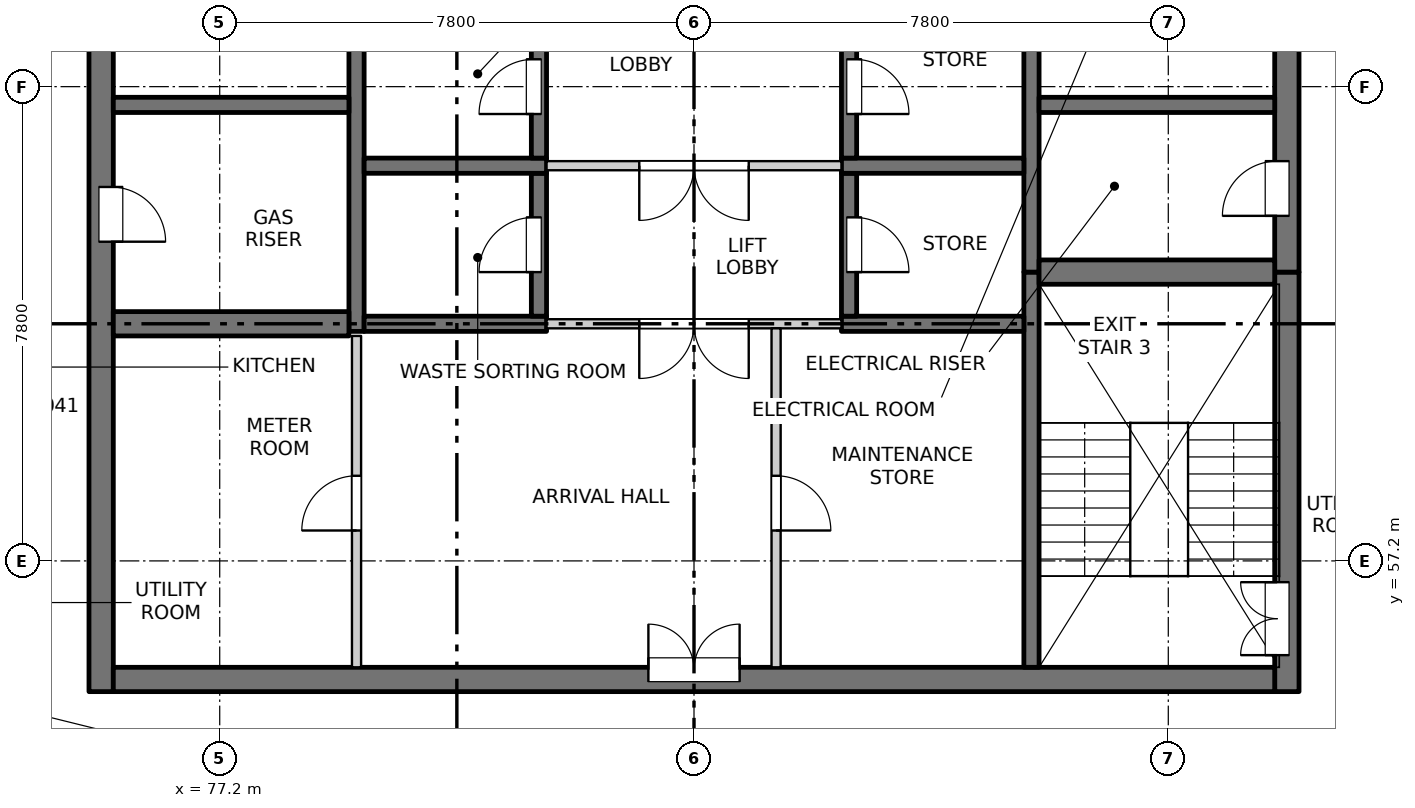
"""IFC4 building model, lengths in metres.
Left out: names, types, materials, properties, quantities, classifications, styles, units other than length and angle.
Written with IfcOpenShell. Run it as: python <this file> out.ifc"""

import sys

from ifc_helpers import new_model, si_unit, direction, frame, frame_2d, origin, place, context, subcontext, project, spatial, rectangle, extrude, element, fill, save


model = new_model("IFC4")
c1 = context("Model", 3, precision=1e-05, world=origin(), true_north=direction((0.0, 1.0)))
c2 = subcontext(c1, "Body", "Model", "MODEL_VIEW")
j1 = project(units=[si_unit("LENGTHUNIT", "METRE"), si_unit("PLANEANGLEUNIT", "RADIAN")], contexts=[c1])
p1 = place(None, origin())
s1 = spatial("IfcSite", under=j1, at=p1, CompositionType="ELEMENT")
p2 = place(p1, origin())
s2 = spatial("IfcBuilding", under=s1, at=p2, CompositionType="ELEMENT")
p3 = place(p2, frame((0.0, 0.0, 197.3)))
s3 = spatial("IfcBuildingStorey", under=s2, at=p3, CompositionType="ELEMENT", Elevation=197.3)
p4 = place(p3, frame((75.25, 55.05, -0.3), z_axis=(0.0, 0.0, 1.0), x_axis=(0.0, 1.0, 0.0)))
e1 = element("IfcWall", 1, at=p4, inside=s3, PredefinedType="SOLIDWALL", context=c2, shape_type="SweptSolid", body=[
    extrude(rectangle(XDim=22.25, YDim=0.4, at=frame_2d((11.125, 0.0))), origin(), (0.0, 0.0, 1.0), 3.45),
])
p5 = place(p4, frame((7.4, 0.0, 0.3)))
e2 = element("IfcOpeningElement", 2, at=p5, cuts=e1, PredefinedType="OPENING", context=c2, shape_type="SweptSolid", body=[
    extrude(rectangle(XDim=0.9, YDim=2.1, at=frame_2d((0.45, 1.05))), frame((0.0, 0.21, 0.0), z_axis=(0.0, -1.0, 0.0), x_axis=(1.0, 0.0, 0.0)), (0.0, 0.0, 1.0), 0.42),
])
p6 = place(p4, frame((13.7, 0.0, 0.3)))
e3 = element("IfcOpeningElement", 3, at=p6, cuts=e1, PredefinedType="OPENING", context=c2, shape_type="SweptSolid", body=[
    extrude(rectangle(XDim=0.9, YDim=2.1, at=frame_2d((0.45, 1.05))), frame((0.0, 0.21, 0.0), z_axis=(0.0, -1.0, 0.0), x_axis=(1.0, 0.0, 0.0)), (0.0, 0.0, 1.0), 0.42),
])
p7 = place(p4, frame((20.0, 0.0, 0.3)))
e4 = element("IfcOpeningElement", 4, at=p7, cuts=e1, PredefinedType="OPENING", context=c2, shape_type="SweptSolid", body=[
    extrude(rectangle(XDim=0.9, YDim=2.1, at=frame_2d((0.45, 1.05))), frame((0.0, 0.21, 0.0), z_axis=(0.0, -1.0, 0.0), x_axis=(1.0, 0.0, 0.0)), (0.0, 0.0, 1.0), 0.42),
])
p8 = place(p3, frame((94.75, 55.05, -0.3), z_axis=(0.0, 0.0, 1.0), x_axis=(0.0, 1.0, 0.0)))
e5 = element("IfcWall", 5, at=p8, inside=s3, PredefinedType="SOLIDWALL", context=c2, shape_type="SweptSolid", body=[
    extrude(rectangle(XDim=6.9, YDim=0.4, at=frame_2d((3.45, 0.0))), origin(), (0.0, 0.0, 1.0), 3.45),
])
p9 = place(p8, frame((0.6, 0.0, 0.3)))
e6 = element("IfcOpeningElement", 6, at=p9, cuts=e5, PredefinedType="OPENING", context=c2, shape_type="SweptSolid", body=[
    extrude(rectangle(XDim=1.2, YDim=2.1, at=frame_2d((0.6, 1.05))), frame((0.0, 0.21, 0.0), z_axis=(0.0, -1.0, 0.0), x_axis=(1.0, 0.0, 0.0)), (0.0, 0.0, 1.0), 0.42),
])
p10 = place(p3, frame((94.75, 61.95, -0.3), z_axis=(0.0, 0.0, 1.0), x_axis=(0.0, 1.0, 0.0)))
e7 = element("IfcWall", 7, at=p10, inside=s3, PredefinedType="SOLIDWALL", context=c2, shape_type="SweptSolid", body=[
    extrude(rectangle(XDim=15.35, YDim=0.4, at=frame_2d((7.675, 0.0))), origin(), (0.0, 0.0, 1.0), 3.45),
])
p11 = place(p10, frame((0.925, 0.0, 0.3)))
e8 = element("IfcOpeningElement", 8, at=p11, cuts=e7, PredefinedType="OPENING", context=c2, shape_type="SweptSolid", body=[
    extrude(rectangle(XDim=0.9, YDim=2.1, at=frame_2d((0.45, 1.05))), frame((0.0, 0.21, 0.0), z_axis=(0.0, -1.0, 0.0), x_axis=(1.0, 0.0, 0.0)), (0.0, 0.0, 1.0), 0.42),
])
p12 = place(p10, frame((3.8, 0.0, 0.3)))
e9 = element("IfcOpeningElement", 9, at=p12, cuts=e7, PredefinedType="OPENING", context=c2, shape_type="SweptSolid", body=[
    extrude(rectangle(XDim=0.9, YDim=2.1, at=frame_2d((0.45, 1.05))), frame((0.0, 0.21, 0.0), z_axis=(0.0, -1.0, 0.0), x_axis=(1.0, 0.0, 0.0)), (0.0, 0.0, 1.0), 0.42),
])
p13 = place(p10, frame((6.8, 0.0, 0.3)))
e10 = element("IfcOpeningElement", 10, at=p13, cuts=e7, PredefinedType="OPENING", context=c2, shape_type="SweptSolid", body=[
    extrude(rectangle(XDim=0.9, YDim=2.1, at=frame_2d((0.45, 1.05))), frame((0.0, 0.21, 0.0), z_axis=(0.0, -1.0, 0.0), x_axis=(1.0, 0.0, 0.0)), (0.0, 0.0, 1.0), 0.42),
])
p14 = place(p10, frame((9.8, 0.0, 0.3)))
e11 = element("IfcOpeningElement", 11, at=p14, cuts=e7, PredefinedType="OPENING", context=c2, shape_type="SweptSolid", body=[
    extrude(rectangle(XDim=0.9, YDim=2.1, at=frame_2d((0.45, 1.05))), frame((0.0, 0.21, 0.0), z_axis=(0.0, -1.0, 0.0), x_axis=(1.0, 0.0, 0.0)), (0.0, 0.0, 1.0), 0.42),
])
p15 = place(p10, frame((13.1, 0.0, 0.3)))
e12 = element("IfcOpeningElement", 12, at=p15, cuts=e7, PredefinedType="OPENING", context=c2, shape_type="SweptSolid", body=[
    extrude(rectangle(XDim=0.9, YDim=2.1, at=frame_2d((0.45, 1.05))), frame((0.0, 0.21, 0.0), z_axis=(0.0, -1.0, 0.0), x_axis=(1.0, 0.0, 0.0)), (0.0, 0.0, 1.0), 0.42),
])
p16 = place(p3, frame((75.45, 55.25, -0.3), z_axis=(0.0, 0.0, 1.0), x_axis=(1.0, 0.0, 0.0)))
e13 = element("IfcWall", 13, at=p16, inside=s3, PredefinedType="SOLIDWALL", context=c2, shape_type="SweptSolid", body=[
    extrude(rectangle(XDim=19.1, YDim=0.4, at=frame_2d((9.55, 0.0))), origin(), (0.0, 0.0, 1.0), 3.45),
])
p17 = place(p16, frame((8.8, 0.0, 0.3)))
e14 = element("IfcOpeningElement", 14, at=p17, cuts=e13, PredefinedType="OPENING", context=c2, shape_type="SweptSolid", body=[
    extrude(rectangle(XDim=1.5, YDim=2.1, at=frame_2d((0.75, 1.05))), frame((0.0, 0.21, 0.0), z_axis=(0.0, -1.0, 0.0), x_axis=(1.0, 0.0, 0.0)), (0.0, 0.0, 1.0), 0.42),
])
p18 = place(p3, frame((79.45, 60.975, -0.3), z_axis=(0.0, 0.0, 1.0), x_axis=(0.0, 1.0, 0.0)))
e15 = element("IfcWall", 15, at=p18, inside=s3, PredefinedType="SOLIDWALL", context=c2, shape_type="SweptSolid", body=[
    extrude(rectangle(XDim=16.325, YDim=0.25, at=frame_2d((8.163, 0.0))), origin(), (0.0, 0.0, 1.0), 3.45),
])
p19 = place(p3, frame((90.55, 55.45, -0.3), z_axis=(0.0, 0.0, 1.0), x_axis=(0.0, 1.0, 0.0)))
e16 = element("IfcWall", 16, at=p19, inside=s3, PredefinedType="SOLIDWALL", context=c2, shape_type="SweptSolid", body=[
    extrude(rectangle(XDim=6.5, YDim=0.25, at=frame_2d((3.25, 0.0))), origin(), (0.0, 0.0, 1.0), 3.45),
])
p20 = place(p3, frame((90.55, 61.95, -0.3), z_axis=(0.0, 0.0, 1.0), x_axis=(0.0, 1.0, 0.0)))
e17 = element("IfcWall", 17, at=p20, inside=s3, PredefinedType="SOLIDWALL", context=c2, shape_type="SweptSolid", body=[
    extrude(rectangle(XDim=15.35, YDim=0.25, at=frame_2d((7.675, 0.0))), origin(), (0.0, 0.0, 1.0), 3.45),
])
p21 = place(p3, frame((79.575, 61.1, -0.3), z_axis=(0.0, 0.0, 1.0), x_axis=(1.0, 0.0, 0.0)))
e18 = element("IfcWall", 18, at=p21, inside=s3, PredefinedType="SOLIDWALL", context=c2, shape_type="SweptSolid", body=[
    extrude(rectangle(XDim=3.0, YDim=0.25, at=frame_2d((1.5, 0.0))), origin(), (0.0, 0.0, 1.0), 3.45),
])
p22 = place(p3, frame((82.45, 61.225, -0.3), z_axis=(0.0, 0.0, 1.0), x_axis=(0.0, 1.0, 0.0)))
e19 = element("IfcWall", 19, at=p22, inside=s3, PredefinedType="SOLIDWALL", context=c2, shape_type="SweptSolid", body=[
    extrude(rectangle(XDim=2.35, YDim=0.25, at=frame_2d((1.175, 0.0))), origin(), (0.0, 0.0, 1.0), 3.45),
])
p23 = place(p22, frame((0.725, 0.0, 0.3)))
e20 = element("IfcOpeningElement", 20, at=p23, cuts=e19, PredefinedType="OPENING", context=c2, shape_type="SweptSolid", body=[
    extrude(rectangle(XDim=0.9, YDim=2.1, at=frame_2d((0.45, 1.05))), frame((0.0, 0.135, 0.0), z_axis=(0.0, -1.0, 0.0), x_axis=(1.0, 0.0, 0.0)), (0.0, 0.0, 1.0), 0.27),
])
p24 = place(p3, frame((79.575, 63.7, -0.3), z_axis=(0.0, 0.0, 1.0), x_axis=(1.0, 0.0, 0.0)))
e21 = element("IfcWall", 21, at=p24, inside=s3, PredefinedType="SOLIDWALL", context=c2, shape_type="SweptSolid", body=[
    extrude(rectangle(XDim=3.0, YDim=0.25, at=frame_2d((1.5, 0.0))), origin(), (0.0, 0.0, 1.0), 3.45),
])
p25 = place(p3, frame((82.45, 63.825, -0.3), z_axis=(0.0, 0.0, 1.0), x_axis=(0.0, 1.0, 0.0)))
e22 = element("IfcWall", 22, at=p25, inside=s3, PredefinedType="SOLIDWALL", context=c2, shape_type="SweptSolid", body=[
    extrude(rectangle(XDim=2.35, YDim=0.25, at=frame_2d((1.175, 0.0))), origin(), (0.0, 0.0, 1.0), 3.45),
])
p26 = place(p25, frame((0.725, 0.0, 0.3)))
e23 = element("IfcOpeningElement", 23, at=p26, cuts=e22, PredefinedType="OPENING", context=c2, shape_type="SweptSolid", body=[
    extrude(rectangle(XDim=0.9, YDim=2.1, at=frame_2d((0.45, 1.05))), frame((0.0, 0.135, 0.0), z_axis=(0.0, -1.0, 0.0), x_axis=(1.0, 0.0, 0.0)), (0.0, 0.0, 1.0), 0.27),
])
p27 = place(p3, frame((87.425, 61.1, -0.3), z_axis=(0.0, 0.0, 1.0), x_axis=(1.0, 0.0, 0.0)))
e24 = element("IfcWall", 24, at=p27, inside=s3, PredefinedType="SOLIDWALL", context=c2, shape_type="SweptSolid", body=[
    extrude(rectangle(XDim=3.0, YDim=0.25, at=frame_2d((1.5, 0.0))), origin(), (0.0, 0.0, 1.0), 3.45),
])
p28 = place(p3, frame((87.55, 61.225, -0.3), z_axis=(0.0, 0.0, 1.0), x_axis=(0.0, 1.0, 0.0)))
e25 = element("IfcWall", 25, at=p28, inside=s3, PredefinedType="SOLIDWALL", context=c2, shape_type="SweptSolid", body=[
    extrude(rectangle(XDim=2.35, YDim=0.25, at=frame_2d((1.175, 0.0))), origin(), (0.0, 0.0, 1.0), 3.45),
])
p29 = place(p28, frame((0.725, 0.0, 0.3)))
e26 = element("IfcOpeningElement", 26, at=p29, cuts=e25, PredefinedType="OPENING", context=c2, shape_type="SweptSolid", body=[
    extrude(rectangle(XDim=0.9, YDim=2.1, at=frame_2d((0.45, 1.05))), frame((0.0, 0.135, 0.0), z_axis=(0.0, -1.0, 0.0), x_axis=(1.0, 0.0, 0.0)), (0.0, 0.0, 1.0), 0.27),
])
p30 = place(p3, frame((87.425, 63.7, -0.3), z_axis=(0.0, 0.0, 1.0), x_axis=(1.0, 0.0, 0.0)))
e27 = element("IfcWall", 27, at=p30, inside=s3, PredefinedType="SOLIDWALL", context=c2, shape_type="SweptSolid", body=[
    extrude(rectangle(XDim=3.0, YDim=0.25, at=frame_2d((1.5, 0.0))), origin(), (0.0, 0.0, 1.0), 3.45),
])
p31 = place(p3, frame((87.55, 63.825, -0.3), z_axis=(0.0, 0.0, 1.0), x_axis=(0.0, 1.0, 0.0)))
e28 = element("IfcWall", 28, at=p31, inside=s3, PredefinedType="SOLIDWALL", context=c2, shape_type="SweptSolid", body=[
    extrude(rectangle(XDim=2.35, YDim=0.25, at=frame_2d((1.175, 0.0))), origin(), (0.0, 0.0, 1.0), 3.45),
])
p32 = place(p31, frame((0.725, 0.0, 0.3)))
e29 = element("IfcOpeningElement", 29, at=p32, cuts=e28, PredefinedType="OPENING", context=c2, shape_type="SweptSolid", body=[
    extrude(rectangle(XDim=0.9, YDim=2.1, at=frame_2d((0.45, 1.05))), frame((0.0, 0.135, 0.0), z_axis=(0.0, -1.0, 0.0), x_axis=(1.0, 0.0, 0.0)), (0.0, 0.0, 1.0), 0.27),
])
p33 = place(p3, frame((75.45, 61.1, -0.3), z_axis=(0.0, 0.0, 1.0), x_axis=(1.0, 0.0, 0.0)))
e30 = element("IfcWall", 30, at=p33, inside=s3, PredefinedType="SOLIDWALL", context=c2, shape_type="SweptSolid", body=[
    extrude(rectangle(XDim=3.875, YDim=0.4, at=frame_2d((1.938, 0.0))), origin(), (0.0, 0.0, 1.0), 3.45),
])
p34 = place(p3, frame((75.45, 64.7, -0.3), z_axis=(0.0, 0.0, 1.0), x_axis=(1.0, 0.0, 0.0)))
e31 = element("IfcWall", 31, at=p34, inside=s3, PredefinedType="SOLIDWALL", context=c2, shape_type="SweptSolid", body=[
    extrude(rectangle(XDim=3.875, YDim=0.25, at=frame_2d((1.938, 0.0))), origin(), (0.0, 0.0, 1.0), 3.45),
])
p35 = place(p3, frame((90.675, 61.95, -0.3), z_axis=(0.0, 0.0, 1.0), x_axis=(1.0, 0.0, 0.0)))
e32 = element("IfcWall", 32, at=p35, inside=s3, PredefinedType="SOLIDWALL", context=c2, shape_type="SweptSolid", body=[
    extrude(rectangle(XDim=3.875, YDim=0.4, at=frame_2d((1.938, 0.0))), origin(), (0.0, 0.0, 1.0), 3.45),
])
p36 = place(p3, frame((90.675, 64.7, -0.3), z_axis=(0.0, 0.0, 1.0), x_axis=(1.0, 0.0, 0.0)))
e33 = element("IfcWall", 33, at=p36, inside=s3, PredefinedType="SOLIDWALL", context=c2, shape_type="SweptSolid", body=[
    extrude(rectangle(XDim=3.875, YDim=0.25, at=frame_2d((1.938, 0.0))), origin(), (0.0, 0.0, 1.0), 3.45),
])
p37 = place(p3, frame((82.575, 61.1, 0.0), z_axis=(0.0, 0.0, 1.0), x_axis=(1.0, 0.0, 0.0)))
e34 = element("IfcWall", 34, at=p37, inside=s3, PredefinedType="PARTITIONING", context=c2, shape_type="SweptSolid", body=[
    extrude(rectangle(XDim=4.85, YDim=0.15, at=frame_2d((2.425, 0.0))), origin(), (0.0, 0.0, 1.0), 3.15),
])
p38 = place(p37, frame((1.525, 0.0, 0.0)))
e35 = element("IfcOpeningElement", 35, at=p38, cuts=e34, PredefinedType="OPENING", context=c2, shape_type="SweptSolid", body=[
    extrude(rectangle(XDim=1.8, YDim=2.1, at=frame_2d((0.9, 1.05))), frame((0.0, 0.085, 0.0), z_axis=(0.0, -1.0, 0.0), x_axis=(1.0, 0.0, 0.0)), (0.0, 0.0, 1.0), 0.17),
])
p39 = place(p3, frame((82.575, 63.7, 0.0), z_axis=(0.0, 0.0, 1.0), x_axis=(1.0, 0.0, 0.0)))
e36 = element("IfcWall", 36, at=p39, inside=s3, PredefinedType="PARTITIONING", context=c2, shape_type="SweptSolid", body=[
    extrude(rectangle(XDim=4.85, YDim=0.15, at=frame_2d((2.425, 0.0))), origin(), (0.0, 0.0, 1.0), 3.15),
])
p40 = place(p39, frame((1.525, 0.0, 0.0)))
e37 = element("IfcOpeningElement", 37, at=p40, cuts=e36, PredefinedType="OPENING", context=c2, shape_type="SweptSolid", body=[
    extrude(rectangle(XDim=1.8, YDim=2.1, at=frame_2d((0.9, 1.05))), frame((0.0, 0.085, 0.0), z_axis=(0.0, -1.0, 0.0), x_axis=(1.0, 0.0, 0.0)), (0.0, 0.0, 1.0), 0.17),
])
p41 = place(p3, frame((79.45, 55.45, 0.0), z_axis=(0.0, 0.0, 1.0), x_axis=(0.0, 1.0, 0.0)))
e38 = element("IfcWall", 38, at=p41, inside=s3, PredefinedType="PARTITIONING", context=c2, shape_type="SweptSolid", body=[
    extrude(rectangle(XDim=5.45, YDim=0.15, at=frame_2d((2.725, 0.0))), origin(), (0.0, 0.0, 1.0), 3.15),
])
p42 = place(p41, frame((2.25, 0.0, 0.0)))
e39 = element("IfcOpeningElement", 39, at=p42, cuts=e38, PredefinedType="OPENING", context=c2, shape_type="SweptSolid", body=[
    extrude(rectangle(XDim=0.9, YDim=2.1, at=frame_2d((0.45, 1.05))), frame((0.0, 0.085, 0.0), z_axis=(0.0, -1.0, 0.0), x_axis=(1.0, 0.0, 0.0)), (0.0, 0.0, 1.0), 0.17),
])
p43 = place(p3, frame((86.35, 55.45, 0.0), z_axis=(0.0, 0.0, 1.0), x_axis=(0.0, 1.0, 0.0)))
e40 = element("IfcWall", 40, at=p43, inside=s3, PredefinedType="PARTITIONING", context=c2, shape_type="SweptSolid", body=[
    extrude(rectangle(XDim=5.575, YDim=0.15, at=frame_2d((2.788, 0.0))), origin(), (0.0, 0.0, 1.0), 3.15),
])
p44 = place(p43, frame((2.25, 0.0, 0.0)))
e41 = element("IfcOpeningElement", 41, at=p44, cuts=e40, PredefinedType="OPENING", context=c2, shape_type="SweptSolid", body=[
    extrude(rectangle(XDim=0.9, YDim=2.1, at=frame_2d((0.45, 1.05))), frame((0.0, 0.085, 0.0), z_axis=(0.0, -1.0, 0.0), x_axis=(1.0, 0.0, 0.0)), (0.0, 0.0, 1.0), 0.17),
])
p45 = place(p17, origin())
e42 = element("IfcDoor", 42, at=p45, inside=s3, OperationType="DOUBLE_DOOR_SINGLE_SWING", PredefinedType="DOOR", context=c2, shape_type="SweptSolid", body=[
    extrude(rectangle(XDim=1.5, YDim=2.1, at=frame_2d((0.75, 1.05))), frame((0.0, 0.185, 0.0), z_axis=(0.0, -1.0, 0.0), x_axis=(1.0, 0.0, 0.0)), (0.0, 0.0, 1.0), 0.05),
])
fill(e14, e42)
p46 = place(p9, origin())
e43 = element("IfcDoor", 43, at=p46, inside=s3, OperationType="DOUBLE_DOOR_SINGLE_SWING", PredefinedType="DOOR", context=c2, shape_type="SweptSolid", body=[
    extrude(rectangle(XDim=1.2, YDim=2.1, at=frame_2d((0.6, 1.05))), frame((0.0, 0.185, 0.0), z_axis=(0.0, -1.0, 0.0), x_axis=(1.0, 0.0, 0.0)), (0.0, 0.0, 1.0), 0.05),
])
fill(e6, e43)
p47 = place(p42, origin())
e44 = element("IfcDoor", 44, at=p47, inside=s3, OperationType="SINGLE_SWING_LEFT", PredefinedType="DOOR", context=c2, shape_type="SweptSolid", body=[
    extrude(rectangle(XDim=0.9, YDim=2.1, at=frame_2d((0.45, 1.05))), frame((0.0, 0.025, 0.0), z_axis=(0.0, -1.0, 0.0), x_axis=(1.0, 0.0, 0.0)), (0.0, 0.0, 1.0), 0.05),
])
fill(e39, e44)
p48 = place(p44, origin())
e45 = element("IfcDoor", 45, at=p48, inside=s3, OperationType="SINGLE_SWING_RIGHT", PredefinedType="DOOR", context=c2, shape_type="SweptSolid", body=[
    extrude(rectangle(XDim=0.9, YDim=2.1, at=frame_2d((0.45, 1.05))), frame((0.0, 0.025, 0.0), z_axis=(0.0, -1.0, 0.0), x_axis=(1.0, 0.0, 0.0)), (0.0, 0.0, 1.0), 0.05),
])
fill(e41, e45)
p49 = place(p38, origin())
e46 = element("IfcDoor", 46, at=p49, inside=s3, OperationType="DOUBLE_DOOR_SINGLE_SWING", PredefinedType="DOOR", context=c2, shape_type="SweptSolid", body=[
    extrude(rectangle(XDim=1.8, YDim=2.1, at=frame_2d((0.9, 1.05))), frame((0.0, 0.025, 0.0), z_axis=(0.0, -1.0, 0.0), x_axis=(1.0, 0.0, 0.0)), (0.0, 0.0, 1.0), 0.05),
])
fill(e35, e46)
p50 = place(p23, origin())
e47 = element("IfcDoor", 47, at=p50, inside=s3, OperationType="SINGLE_SWING_LEFT", PredefinedType="DOOR", context=c2, shape_type="SweptSolid", body=[
    extrude(rectangle(XDim=0.9, YDim=2.1, at=frame_2d((0.45, 1.05))), frame((0.0, 0.11, 0.0), z_axis=(0.0, -1.0, 0.0), x_axis=(1.0, 0.0, 0.0)), (0.0, 0.0, 1.0), 0.05),
])
fill(e20, e47)
p51 = place(p29, origin())
e48 = element("IfcDoor", 48, at=p51, inside=s3, OperationType="SINGLE_SWING_RIGHT", PredefinedType="DOOR", context=c2, shape_type="SweptSolid", body=[
    extrude(rectangle(XDim=0.9, YDim=2.1, at=frame_2d((0.45, 1.05))), frame((0.0, -0.06, 0.0), z_axis=(0.0, -1.0, 0.0), x_axis=(1.0, 0.0, 0.0)), (0.0, 0.0, 1.0), 0.05),
])
fill(e26, e48)
p52 = place(p5, origin())
e49 = element("IfcDoor", 49, at=p52, inside=s3, OperationType="SINGLE_SWING_RIGHT", PredefinedType="DOOR", context=c2, shape_type="SweptSolid", body=[
    extrude(rectangle(XDim=0.9, YDim=2.1, at=frame_2d((0.45, 1.05))), frame((0.0, -0.135, 0.0), z_axis=(0.0, -1.0, 0.0), x_axis=(1.0, 0.0, 0.0)), (0.0, 0.0, 1.0), 0.05),
])
fill(e2, e49)
p53 = place(p11, origin())
e50 = element("IfcDoor", 50, at=p53, inside=s3, OperationType="SINGLE_SWING_LEFT", PredefinedType="DOOR", context=c2, shape_type="SweptSolid", body=[
    extrude(rectangle(XDim=0.9, YDim=2.1, at=frame_2d((0.45, 1.05))), frame((0.0, 0.185, 0.0), z_axis=(0.0, -1.0, 0.0), x_axis=(1.0, 0.0, 0.0)), (0.0, 0.0, 1.0), 0.05),
])
fill(e8, e50)
p54 = place(p40, origin())
e51 = element("IfcDoor", 51, at=p54, inside=s3, OperationType="DOUBLE_DOOR_SINGLE_SWING", PredefinedType="DOOR", context=c2, shape_type="SweptSolid", body=[
    extrude(rectangle(XDim=1.8, YDim=2.1, at=frame_2d((0.9, 1.05))), frame((0.0, 0.025, 0.0), z_axis=(0.0, -1.0, 0.0), x_axis=(1.0, 0.0, 0.0)), (0.0, 0.0, 1.0), 0.05),
])
fill(e37, e51)
p55 = place(p26, origin())
e52 = element("IfcDoor", 52, at=p55, inside=s3, OperationType="SINGLE_SWING_LEFT", PredefinedType="DOOR", context=c2, shape_type="SweptSolid", body=[
    extrude(rectangle(XDim=0.9, YDim=2.1, at=frame_2d((0.45, 1.05))), frame((0.0, 0.11, 0.0), z_axis=(0.0, -1.0, 0.0), x_axis=(1.0, 0.0, 0.0)), (0.0, 0.0, 1.0), 0.05),
])
fill(e23, e52)
p56 = place(p32, origin())
e53 = element("IfcDoor", 53, at=p56, inside=s3, OperationType="SINGLE_SWING_RIGHT", PredefinedType="DOOR", context=c2, shape_type="SweptSolid", body=[
    extrude(rectangle(XDim=0.9, YDim=2.1, at=frame_2d((0.45, 1.05))), frame((0.0, -0.06, 0.0), z_axis=(0.0, -1.0, 0.0), x_axis=(1.0, 0.0, 0.0)), (0.0, 0.0, 1.0), 0.05),
])
fill(e29, e53)
save(model, sys.argv[1])
